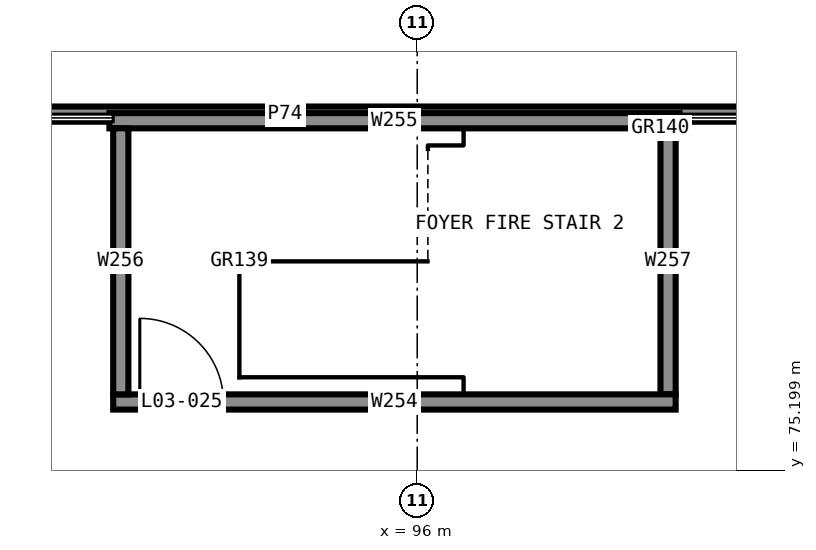
"""IFC4 building model, lengths in metres.
Left out: names, types, materials, properties, quantities, classifications, styles, units other than length and angle.
Written with IfcOpenShell. Run it as: python <this file> out.ifc"""

import sys

from ifc_helpers import new_model, si_unit, direction, frame, frame_2d, origin, place, context, subcontext, project, spatial, rectangle, extrude, element, fill, save


model = new_model("IFC4")
c1 = context("Model", 3, precision=1e-05, world=origin(), true_north=direction((0.0, 1.0)))
c2 = subcontext(c1, "Body", "Model", "MODEL_VIEW")
j1 = project(units=[si_unit("LENGTHUNIT", "METRE"), si_unit("PLANEANGLEUNIT", "RADIAN")], contexts=[c1])
p1 = place(None, origin())
s1 = spatial("IfcSite", under=j1, at=p1, CompositionType="ELEMENT")
p2 = place(p1, origin())
s2 = spatial("IfcBuilding", under=s1, at=p2, CompositionType="ELEMENT")
p3 = place(p2, frame((0.0, 0.0, 13.5)))
s3 = spatial("IfcBuildingStorey", under=s2, at=p3, CompositionType="ELEMENT", Elevation=13.5)
p4 = place(p3, frame((92.0, 76.1, 0.0), z_axis=(0.0, 0.0, 1.0), x_axis=(1.0, 0.0, 0.0)))
e1 = element("IfcWall", 1, at=p4, inside=s3, PredefinedType="SHEAR", context=c2, shape_type="SweptSolid", body=[
    extrude(rectangle(XDim=7.4, YDim=0.2, at=frame_2d((3.7, 0.0))), origin(), (0.0, 0.0, 1.0), 3.7),
])
p5 = place(p4, frame((0.35, 0.0, 0.0)))
e2 = element("IfcOpeningElement", 2, at=p5, cuts=e1, PredefinedType="OPENING", context=c2, shape_type="SweptSolid", body=[
    extrude(rectangle(XDim=1.1, YDim=2.1, at=frame_2d((0.55, 1.05))), frame((0.0, 0.11, 0.0), z_axis=(0.0, -1.0, 0.0), x_axis=(1.0, 0.0, 0.0)), (0.0, 0.0, 1.0), 0.22),
])
p6 = place(p3, frame((99.45, 79.8, 0.0), z_axis=(0.0, 0.0, 1.0), x_axis=(-1.0, 0.0, 0.0)))
e3 = element("IfcWall", 3, at=p6, inside=s3, PredefinedType="SHEAR", context=c2, shape_type="SweptSolid", body=[
    extrude(rectangle(XDim=7.5, YDim=0.2, at=frame_2d((3.75, 0.0))), origin(), (0.0, 0.0, 1.0), 3.7),
])
for number, where, z_axis, x_axis in (
    (4, (92.1, 79.7, 0.0), (0.0, 0.0, 1.0), (0.0, -1.0, 0.0)),
    (5, (99.3, 76.2, 0.0), (0.0, 0.0, 1.0), (0.0, 1.0, 0.0)),
):
    element("IfcWall", number, at=place(p3, frame(where, z_axis=z_axis, x_axis=x_axis)), inside=s3, PredefinedType="SHEAR", context=c2, shape_type="SweptSolid", body=[
        extrude(rectangle(XDim=3.5, YDim=0.2, at=frame_2d((1.75, 0.0))), origin(), (0.0, 0.0, 1.0), 3.7),
    ])
p7 = place(p3, frame((78.26, 79.887, 4.0), z_axis=(0.0, 0.0, 1.0), x_axis=(1.0, 0.0, 0.0)))
e6 = element("IfcWall", 6, at=p7, inside=s3, PredefinedType="PARAPET", context=c2, shape_type="SweptSolid", body=[
    extrude(rectangle(XDim=32.003, YDim=0.2, at=frame_2d((16.002, 0.0))), origin(), (0.0, 0.0, 1.0), 1.1),
])
p8 = place(p5, origin())
e7 = element("IfcDoor", 7, at=p8, inside=s3, OperationType="SINGLE_SWING_RIGHT", PredefinedType="DOOR", context=c2, shape_type="SweptSolid", body=[
    extrude(rectangle(XDim=1.1, YDim=2.1, at=frame_2d((0.55, 1.05))), frame((0.0, 0.025, 0.0), z_axis=(0.0, -1.0, 0.0), x_axis=(1.0, 0.0, 0.0)), (0.0, 0.0, 1.0), 0.05),
])
fill(e2, e7)
save(model, sys.argv[1])
